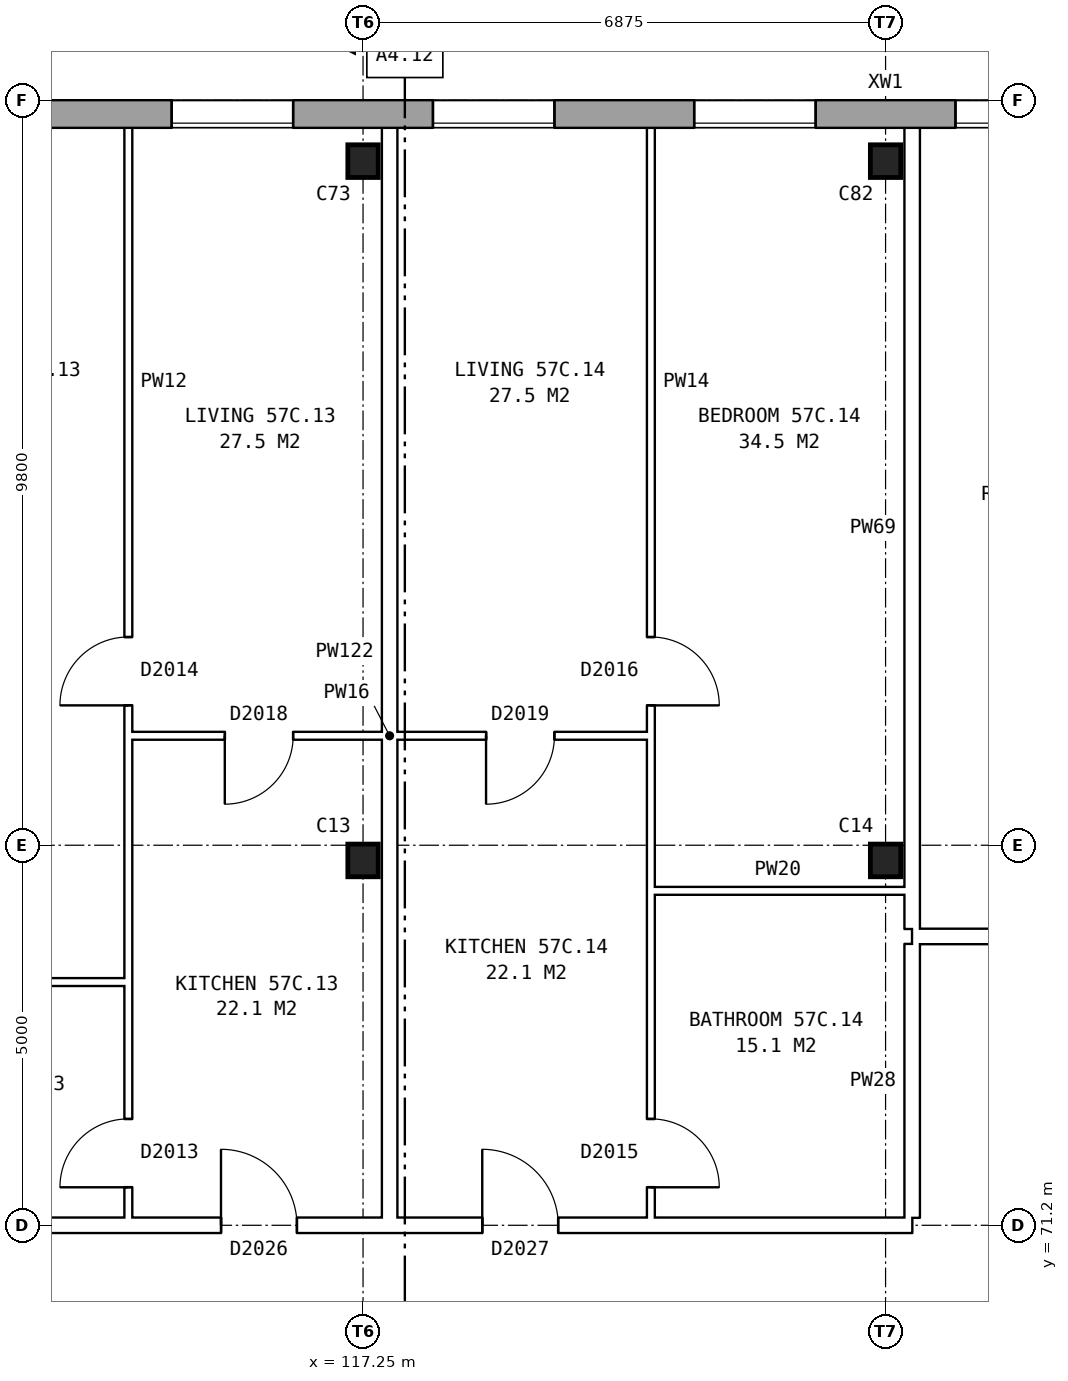
"""IFC4 building model, lengths in metres.
Left out: names, types, materials, properties, quantities, classifications, styles, units other than length and angle.
Written with IfcOpenShell. Run it as: python <this file> out.ifc"""

import sys

from ifc_helpers import new_model, si_unit, direction, frame, frame_2d, origin, origin_2d, place, context, subcontext, project, spatial, rectangle, i_section, extrude, element, fill, save


model = new_model("IFC4")
c1 = context("Model", 3, precision=1e-05, world=origin(), true_north=direction((0.0, 1.0)))
c2 = subcontext(c1, "Body", "Model", "MODEL_VIEW")
j1 = project(units=[si_unit("LENGTHUNIT", "METRE"), si_unit("PLANEANGLEUNIT", "RADIAN")], contexts=[c1])
p1 = place(None, origin())
s1 = spatial("IfcSite", under=j1, at=p1, CompositionType="ELEMENT")
p2 = place(p1, origin())
s2 = spatial("IfcBuilding", under=s1, at=p2, CompositionType="ELEMENT")
p3 = place(p2, frame((0.0, 0.0, 202.8)))
s3 = spatial("IfcBuildingStorey", under=s2, at=p3, CompositionType="ELEMENT", Elevation=202.8)
for number, where, z_axis, x_axis in (
    (1, (117.25, 76.0, 0.0), (0.0, 0.0, 1.0), (1.0, 0.0, 0.0)),
    (2, (124.125, 76.0, 0.0), (0.0, 0.0, 1.0), (1.0, 0.0, 0.0)),
    (3, (117.25, 85.2, 0.0), (0.0, 0.0, 1.0), (1.0, 0.0, 0.0)),
    (4, (124.125, 85.2, 0.0), (0.0, 0.0, 1.0), (1.0, 0.0, 0.0)),
):
    element("IfcColumn", number, at=place(p3, frame(where, z_axis=z_axis, x_axis=x_axis)), inside=s3, PredefinedType="COLUMN", context=c2, shape_type="SweptSolid", body=[
        extrude(i_section(OverallWidth=0.4, OverallDepth=0.43, WebThickness=0.04, FlangeThickness=0.04, at=origin_2d()), origin(), (0.0, 0.0, 1.0), 2.85),
    ])
p4 = place(p3, frame((131.05, 85.82, 0.0), z_axis=(0.0, 0.0, 1.0), x_axis=(-1.0, 0.0, 0.0)))
e5 = element("IfcWall", 5, at=p4, inside=s3, PredefinedType="STANDARD", context=c2, shape_type="SweptSolid", body=[
    extrude(rectangle(XDim=55.1, YDim=0.36, at=frame_2d((27.55, 0.0))), origin(), (0.0, 0.0, 1.0), 2.85),
])
p5 = place(p4, frame((0.969, 0.0, 0.8)))
e6 = element("IfcOpeningElement", 6, at=p5, cuts=e5, PredefinedType="OPENING", context=c2, shape_type="SweptSolid", body=[
    extrude(rectangle(XDim=1.6, YDim=1.8, at=frame_2d((0.8, 0.9))), frame((0.0, 0.19, 0.0), z_axis=(0.0, -1.0, 0.0), x_axis=(1.0, 0.0, 0.0)), (0.0, 0.0, 1.0), 0.38),
])
p6 = place(p4, frame((4.406, 0.0, 0.8)))
e7 = element("IfcOpeningElement", 7, at=p6, cuts=e5, PredefinedType="OPENING", context=c2, shape_type="SweptSolid", body=[
    extrude(rectangle(XDim=1.6, YDim=1.8, at=frame_2d((0.8, 0.9))), frame((0.0, 0.19, 0.0), z_axis=(0.0, -1.0, 0.0), x_axis=(1.0, 0.0, 0.0)), (0.0, 0.0, 1.0), 0.38),
])
p7 = place(p4, frame((7.844, 0.0, 0.8)))
e8 = element("IfcOpeningElement", 8, at=p7, cuts=e5, PredefinedType="OPENING", context=c2, shape_type="SweptSolid", body=[
    extrude(rectangle(XDim=1.6, YDim=1.8, at=frame_2d((0.8, 0.9))), frame((0.0, 0.19, 0.0), z_axis=(0.0, -1.0, 0.0), x_axis=(1.0, 0.0, 0.0)), (0.0, 0.0, 1.0), 0.38),
])
p8 = place(p4, frame((11.281, 0.0, 0.8)))
e9 = element("IfcOpeningElement", 9, at=p8, cuts=e5, PredefinedType="OPENING", context=c2, shape_type="SweptSolid", body=[
    extrude(rectangle(XDim=1.6, YDim=1.8, at=frame_2d((0.8, 0.9))), frame((0.0, 0.19, 0.0), z_axis=(0.0, -1.0, 0.0), x_axis=(1.0, 0.0, 0.0)), (0.0, 0.0, 1.0), 0.38),
])
p9 = place(p4, frame((14.719, 0.0, 0.8)))
e10 = element("IfcOpeningElement", 10, at=p9, cuts=e5, PredefinedType="OPENING", context=c2, shape_type="SweptSolid", body=[
    extrude(rectangle(XDim=1.6, YDim=1.8, at=frame_2d((0.8, 0.9))), frame((0.0, 0.19, 0.0), z_axis=(0.0, -1.0, 0.0), x_axis=(1.0, 0.0, 0.0)), (0.0, 0.0, 1.0), 0.38),
])
p10 = place(p4, frame((18.156, 0.0, 0.8)))
e11 = element("IfcOpeningElement", 11, at=p10, cuts=e5, PredefinedType="OPENING", context=c2, shape_type="SweptSolid", body=[
    extrude(rectangle(XDim=1.6, YDim=1.8, at=frame_2d((0.8, 0.9))), frame((0.0, 0.19, 0.0), z_axis=(0.0, -1.0, 0.0), x_axis=(1.0, 0.0, 0.0)), (0.0, 0.0, 1.0), 0.38),
])
p11 = place(p4, frame((21.594, 0.0, 0.8)))
e12 = element("IfcOpeningElement", 12, at=p11, cuts=e5, PredefinedType="OPENING", context=c2, shape_type="SweptSolid", body=[
    extrude(rectangle(XDim=1.6, YDim=1.8, at=frame_2d((0.8, 0.9))), frame((0.0, 0.19, 0.0), z_axis=(0.0, -1.0, 0.0), x_axis=(1.0, 0.0, 0.0)), (0.0, 0.0, 1.0), 0.38),
])
p12 = place(p4, frame((25.031, 0.0, 0.8)))
e13 = element("IfcOpeningElement", 13, at=p12, cuts=e5, PredefinedType="OPENING", context=c2, shape_type="SweptSolid", body=[
    extrude(rectangle(XDim=1.6, YDim=1.8, at=frame_2d((0.8, 0.9))), frame((0.0, 0.19, 0.0), z_axis=(0.0, -1.0, 0.0), x_axis=(1.0, 0.0, 0.0)), (0.0, 0.0, 1.0), 0.38),
])
p13 = place(p4, frame((28.469, 0.0, 0.8)))
e14 = element("IfcOpeningElement", 14, at=p13, cuts=e5, PredefinedType="OPENING", context=c2, shape_type="SweptSolid", body=[
    extrude(rectangle(XDim=1.6, YDim=1.8, at=frame_2d((0.8, 0.9))), frame((0.0, 0.19, 0.0), z_axis=(0.0, -1.0, 0.0), x_axis=(1.0, 0.0, 0.0)), (0.0, 0.0, 1.0), 0.38),
])
p14 = place(p4, frame((31.906, 0.0, 0.8)))
e15 = element("IfcOpeningElement", 15, at=p14, cuts=e5, PredefinedType="OPENING", context=c2, shape_type="SweptSolid", body=[
    extrude(rectangle(XDim=1.6, YDim=1.8, at=frame_2d((0.8, 0.9))), frame((0.0, 0.19, 0.0), z_axis=(0.0, -1.0, 0.0), x_axis=(1.0, 0.0, 0.0)), (0.0, 0.0, 1.0), 0.38),
])
p15 = place(p4, frame((35.344, 0.0, 0.8)))
e16 = element("IfcOpeningElement", 16, at=p15, cuts=e5, PredefinedType="OPENING", context=c2, shape_type="SweptSolid", body=[
    extrude(rectangle(XDim=1.6, YDim=1.8, at=frame_2d((0.8, 0.9))), frame((0.0, 0.19, 0.0), z_axis=(0.0, -1.0, 0.0), x_axis=(1.0, 0.0, 0.0)), (0.0, 0.0, 1.0), 0.38),
])
p16 = place(p4, frame((38.781, 0.0, 0.8)))
e17 = element("IfcOpeningElement", 17, at=p16, cuts=e5, PredefinedType="OPENING", context=c2, shape_type="SweptSolid", body=[
    extrude(rectangle(XDim=1.6, YDim=1.8, at=frame_2d((0.8, 0.9))), frame((0.0, 0.19, 0.0), z_axis=(0.0, -1.0, 0.0), x_axis=(1.0, 0.0, 0.0)), (0.0, 0.0, 1.0), 0.38),
])
p17 = place(p4, frame((42.219, 0.0, 0.8)))
e18 = element("IfcOpeningElement", 18, at=p17, cuts=e5, PredefinedType="OPENING", context=c2, shape_type="SweptSolid", body=[
    extrude(rectangle(XDim=1.6, YDim=1.8, at=frame_2d((0.8, 0.9))), frame((0.0, 0.19, 0.0), z_axis=(0.0, -1.0, 0.0), x_axis=(1.0, 0.0, 0.0)), (0.0, 0.0, 1.0), 0.38),
])
p18 = place(p4, frame((45.656, 0.0, 0.8)))
e19 = element("IfcOpeningElement", 19, at=p18, cuts=e5, PredefinedType="OPENING", context=c2, shape_type="SweptSolid", body=[
    extrude(rectangle(XDim=1.6, YDim=1.8, at=frame_2d((0.8, 0.9))), frame((0.0, 0.19, 0.0), z_axis=(0.0, -1.0, 0.0), x_axis=(1.0, 0.0, 0.0)), (0.0, 0.0, 1.0), 0.38),
])
p19 = place(p4, frame((49.094, 0.0, 0.8)))
e20 = element("IfcOpeningElement", 20, at=p19, cuts=e5, PredefinedType="OPENING", context=c2, shape_type="SweptSolid", body=[
    extrude(rectangle(XDim=1.6, YDim=1.8, at=frame_2d((0.8, 0.9))), frame((0.0, 0.19, 0.0), z_axis=(0.0, -1.0, 0.0), x_axis=(1.0, 0.0, 0.0)), (0.0, 0.0, 1.0), 0.38),
])
p20 = place(p4, frame((52.531, 0.0, 0.8)))
e21 = element("IfcOpeningElement", 21, at=p20, cuts=e5, PredefinedType="OPENING", context=c2, shape_type="SweptSolid", body=[
    extrude(rectangle(XDim=1.6, YDim=1.8, at=frame_2d((0.8, 0.9))), frame((0.0, 0.19, 0.0), z_axis=(0.0, -1.0, 0.0), x_axis=(1.0, 0.0, 0.0)), (0.0, 0.0, 1.0), 0.38),
])
p21 = place(p3, frame((83.225, 71.2, 0.0), z_axis=(0.0, 0.0, 1.0), x_axis=(1.0, 0.0, 0.0)))
e22 = element("IfcWall", 22, at=p21, inside=s3, PredefinedType="PARTITIONING", context=c2, shape_type="SweptSolid", body=[
    extrude(rectangle(XDim=41.25, YDim=0.2, at=frame_2d((20.625, 0.0))), origin(), (0.0, 0.0, 1.0), 2.85),
])
p22 = place(p21, frame((4.656, 0.0, 0.0)))
e23 = element("IfcOpeningElement", 23, at=p22, cuts=e22, PredefinedType="OPENING", context=c2, shape_type="SweptSolid", body=[
    extrude(rectangle(XDim=1.0, YDim=2.1, at=frame_2d((0.5, 1.05))), frame((0.0, 0.11, 0.0), z_axis=(0.0, -1.0, 0.0), x_axis=(1.0, 0.0, 0.0)), (0.0, 0.0, 1.0), 0.22),
])
p23 = place(p21, frame((11.531, 0.0, 0.0)))
e24 = element("IfcOpeningElement", 24, at=p23, cuts=e22, PredefinedType="OPENING", context=c2, shape_type="SweptSolid", body=[
    extrude(rectangle(XDim=1.0, YDim=2.1, at=frame_2d((0.5, 1.05))), frame((0.0, 0.11, 0.0), z_axis=(0.0, -1.0, 0.0), x_axis=(1.0, 0.0, 0.0)), (0.0, 0.0, 1.0), 0.22),
])
p24 = place(p21, frame((21.844, 0.0, 0.0)))
e25 = element("IfcOpeningElement", 25, at=p24, cuts=e22, PredefinedType="OPENING", context=c2, shape_type="SweptSolid", body=[
    extrude(rectangle(XDim=1.0, YDim=2.1, at=frame_2d((0.5, 1.05))), frame((0.0, 0.11, 0.0), z_axis=(0.0, -1.0, 0.0), x_axis=(1.0, 0.0, 0.0)), (0.0, 0.0, 1.0), 0.22),
])
p25 = place(p21, frame((32.156, 0.0, 0.0)))
e26 = element("IfcOpeningElement", 26, at=p25, cuts=e22, PredefinedType="OPENING", context=c2, shape_type="SweptSolid", body=[
    extrude(rectangle(XDim=1.0, YDim=2.1, at=frame_2d((0.5, 1.05))), frame((0.0, 0.11, 0.0), z_axis=(0.0, -1.0, 0.0), x_axis=(1.0, 0.0, 0.0)), (0.0, 0.0, 1.0), 0.22),
])
p26 = place(p21, frame((35.594, 0.0, 0.0)))
e27 = element("IfcOpeningElement", 27, at=p26, cuts=e22, PredefinedType="OPENING", context=c2, shape_type="SweptSolid", body=[
    extrude(rectangle(XDim=1.0, YDim=2.1, at=frame_2d((0.5, 1.05))), frame((0.0, 0.11, 0.0), z_axis=(0.0, -1.0, 0.0), x_axis=(1.0, 0.0, 0.0)), (0.0, 0.0, 1.0), 0.22),
])
p27 = place(p3, frame((110.825, 74.4, 0.0), z_axis=(0.0, 0.0, 1.0), x_axis=(1.0, 0.0, 0.0)))
e28 = element("IfcWall", 28, at=p27, inside=s3, PredefinedType="PARTITIONING", context=c2, shape_type="SweptSolid", body=[
    extrude(rectangle(XDim=3.337, YDim=0.1, at=frame_2d((1.668, 0.0))), origin(), (0.0, 0.0, 1.0), 2.85),
])
p28 = place(p3, frame((124.475, 75.0, 0.0), z_axis=(0.0, 0.0, 1.0), x_axis=(1.0, 0.0, 0.0)))
e29 = element("IfcWall", 29, at=p28, inside=s3, PredefinedType="PARTITIONING", context=c2, shape_type="SweptSolid", body=[
    extrude(rectangle(XDim=6.885, YDim=0.2, at=frame_2d((3.442, 0.0))), origin(), (0.0, 0.0, 1.0), 2.85),
])
p29 = place(p28, frame((2.992, 0.0, 0.0)))
e30 = element("IfcOpeningElement", 30, at=p29, cuts=e29, PredefinedType="OPENING", context=c2, shape_type="SweptSolid", body=[
    extrude(rectangle(XDim=0.9, YDim=2.1, at=frame_2d((0.45, 1.05))), frame((0.0, 0.11, 0.0), z_axis=(0.0, -1.0, 0.0), x_axis=(1.0, 0.0, 0.0)), (0.0, 0.0, 1.0), 0.22),
])
p30 = place(p3, frame((121.037, 75.6, 0.0), z_axis=(0.0, 0.0, 1.0), x_axis=(1.0, 0.0, 0.0)))
e31 = element("IfcWall", 31, at=p30, inside=s3, PredefinedType="PARTITIONING", context=c2, shape_type="SweptSolid", body=[
    extrude(rectangle(XDim=3.338, YDim=0.1, at=frame_2d((1.669, 0.0))), origin(), (0.0, 0.0, 1.0), 2.85),
])
p31 = place(p3, frame((114.162, 77.64, 0.0), z_axis=(0.0, 0.0, 1.0), x_axis=(1.0, 0.0, 0.0)))
e32 = element("IfcWall", 32, at=p31, inside=s3, PredefinedType="PARTITIONING", context=c2, shape_type="SweptSolid", body=[
    extrude(rectangle(XDim=6.875, YDim=0.1, at=frame_2d((3.438, 0.0))), origin(), (0.0, 0.0, 1.0), 2.85),
])
p32 = place(p31, frame((1.269, 0.0, 0.0)))
e33 = element("IfcOpeningElement", 33, at=p32, cuts=e32, PredefinedType="OPENING", context=c2, shape_type="SweptSolid", body=[
    extrude(rectangle(XDim=0.9, YDim=2.1, at=frame_2d((0.45, 1.05))), frame((0.0, 0.06, 0.0), z_axis=(0.0, -1.0, 0.0), x_axis=(1.0, 0.0, 0.0)), (0.0, 0.0, 1.0), 0.12),
])
p33 = place(p31, frame((4.707, 0.0, 0.0)))
e34 = element("IfcOpeningElement", 34, at=p33, cuts=e32, PredefinedType="OPENING", context=c2, shape_type="SweptSolid", body=[
    extrude(rectangle(XDim=0.9, YDim=2.1, at=frame_2d((0.45, 1.05))), frame((0.0, 0.06, 0.0), z_axis=(0.0, -1.0, 0.0), x_axis=(1.0, 0.0, 0.0)), (0.0, 0.0, 1.0), 0.12),
])
p34 = place(p3, frame((114.162, 71.3, 0.0), z_axis=(0.0, 0.0, 1.0), x_axis=(0.0, 1.0, 0.0)))
e35 = element("IfcWall", 35, at=p34, inside=s3, PredefinedType="PARTITIONING", context=c2, shape_type="SweptSolid", body=[
    extrude(rectangle(XDim=14.34, YDim=0.1, at=frame_2d((7.17, 0.0))), origin(), (0.0, 0.0, 1.0), 2.85),
])
p35 = place(p34, frame((6.74, 0.0, 0.0)))
e36 = element("IfcOpeningElement", 36, at=p35, cuts=e35, PredefinedType="OPENING", context=c2, shape_type="SweptSolid", body=[
    extrude(rectangle(XDim=0.9, YDim=2.1, at=frame_2d((0.45, 1.05))), frame((0.0, 0.06, 0.0), z_axis=(0.0, -1.0, 0.0), x_axis=(1.0, 0.0, 0.0)), (0.0, 0.0, 1.0), 0.12),
])
p36 = place(p34, frame((0.4, 0.0, 0.0)))
e37 = element("IfcOpeningElement", 37, at=p36, cuts=e35, PredefinedType="OPENING", context=c2, shape_type="SweptSolid", body=[
    extrude(rectangle(XDim=0.9, YDim=2.1, at=frame_2d((0.45, 1.05))), frame((0.0, 0.06, 0.0), z_axis=(0.0, -1.0, 0.0), x_axis=(1.0, 0.0, 0.0)), (0.0, 0.0, 1.0), 0.12),
])
p37 = place(p3, frame((117.6, 71.3, 0.0), z_axis=(0.0, 0.0, 1.0), x_axis=(0.0, 1.0, 0.0)))
e38 = element("IfcWall", 38, at=p37, inside=s3, PredefinedType="PARTITIONING", context=c2, shape_type="SweptSolid", body=[
    extrude(rectangle(XDim=14.34, YDim=0.2, at=frame_2d((7.17, 0.0))), origin(), (0.0, 0.0, 1.0), 2.85),
])
p38 = place(p3, frame((121.037, 71.3, 0.0), z_axis=(0.0, 0.0, 1.0), x_axis=(0.0, 1.0, 0.0)))
e39 = element("IfcWall", 39, at=p38, inside=s3, PredefinedType="PARTITIONING", context=c2, shape_type="SweptSolid", body=[
    extrude(rectangle(XDim=14.34, YDim=0.1, at=frame_2d((7.17, 0.0))), origin(), (0.0, 0.0, 1.0), 2.85),
])
p39 = place(p38, frame((6.74, 0.0, 0.0)))
e40 = element("IfcOpeningElement", 40, at=p39, cuts=e39, PredefinedType="OPENING", context=c2, shape_type="SweptSolid", body=[
    extrude(rectangle(XDim=0.9, YDim=2.1, at=frame_2d((0.45, 1.05))), frame((0.0, 0.06, 0.0), z_axis=(0.0, -1.0, 0.0), x_axis=(1.0, 0.0, 0.0)), (0.0, 0.0, 1.0), 0.12),
])
p40 = place(p38, frame((0.4, 0.0, 0.0)))
e41 = element("IfcOpeningElement", 41, at=p40, cuts=e39, PredefinedType="OPENING", context=c2, shape_type="SweptSolid", body=[
    extrude(rectangle(XDim=0.9, YDim=2.1, at=frame_2d((0.45, 1.05))), frame((0.0, 0.06, 0.0), z_axis=(0.0, -1.0, 0.0), x_axis=(1.0, 0.0, 0.0)), (0.0, 0.0, 1.0), 0.12),
])
p41 = place(p3, frame((124.475, 71.3, 0.0), z_axis=(0.0, 0.0, 1.0), x_axis=(0.0, 1.0, 0.0)))
e42 = element("IfcWall", 42, at=p41, inside=s3, PredefinedType="PARTITIONING", context=c2, shape_type="SweptSolid", body=[
    extrude(rectangle(XDim=3.6, YDim=0.2, at=frame_2d((1.8, 0.0))), origin(), (0.0, 0.0, 1.0), 2.85),
])
p42 = place(p3, frame((124.475, 75.1, 0.0), z_axis=(0.0, 0.0, 1.0), x_axis=(0.0, 1.0, 0.0)))
e43 = element("IfcWall", 43, at=p42, inside=s3, PredefinedType="PARTITIONING", context=c2, shape_type="SweptSolid", body=[
    extrude(rectangle(XDim=10.54, YDim=0.2, at=frame_2d((5.27, 0.0))), origin(), (0.0, 0.0, 1.0), 2.85),
])
p43 = place(p6, origin())
e44 = element("IfcWindow", 44, at=p43, inside=s3, PartitioningType="SINGLE_PANEL", PredefinedType="WINDOW", context=c2, shape_type="SweptSolid", body=[
    extrude(rectangle(XDim=1.6, YDim=1.8, at=frame_2d((0.8, 0.9))), frame((0.0, 0.15, 0.0), z_axis=(0.0, -1.0, 0.0), x_axis=(1.0, 0.0, 0.0)), (0.0, 0.0, 1.0), 0.06),
])
fill(e7, e44)
p44 = place(p7, origin())
e45 = element("IfcWindow", 45, at=p44, inside=s3, PartitioningType="SINGLE_PANEL", PredefinedType="WINDOW", context=c2, shape_type="SweptSolid", body=[
    extrude(rectangle(XDim=1.6, YDim=1.8, at=frame_2d((0.8, 0.9))), frame((0.0, 0.15, 0.0), z_axis=(0.0, -1.0, 0.0), x_axis=(1.0, 0.0, 0.0)), (0.0, 0.0, 1.0), 0.06),
])
fill(e8, e45)
p45 = place(p8, origin())
e46 = element("IfcWindow", 46, at=p45, inside=s3, PartitioningType="SINGLE_PANEL", PredefinedType="WINDOW", context=c2, shape_type="SweptSolid", body=[
    extrude(rectangle(XDim=1.6, YDim=1.8, at=frame_2d((0.8, 0.9))), frame((0.0, 0.15, 0.0), z_axis=(0.0, -1.0, 0.0), x_axis=(1.0, 0.0, 0.0)), (0.0, 0.0, 1.0), 0.06),
])
fill(e9, e46)
p46 = place(p9, origin())
e47 = element("IfcWindow", 47, at=p46, inside=s3, PartitioningType="SINGLE_PANEL", PredefinedType="WINDOW", context=c2, shape_type="SweptSolid", body=[
    extrude(rectangle(XDim=1.6, YDim=1.8, at=frame_2d((0.8, 0.9))), frame((0.0, 0.15, 0.0), z_axis=(0.0, -1.0, 0.0), x_axis=(1.0, 0.0, 0.0)), (0.0, 0.0, 1.0), 0.06),
])
fill(e10, e47)
p47 = place(p35, origin())
e48 = element("IfcDoor", 48, at=p47, inside=s3, OperationType="SINGLE_SWING_LEFT", PredefinedType="DOOR", context=c2, shape_type="SweptSolid", body=[
    extrude(rectangle(XDim=0.9, YDim=2.1, at=frame_2d((0.45, 1.05))), frame((0.0, 0.025, 0.0), z_axis=(0.0, -1.0, 0.0), x_axis=(1.0, 0.0, 0.0)), (0.0, 0.0, 1.0), 0.05),
])
fill(e36, e48)
p48 = place(p25, origin())
e49 = element("IfcDoor", 49, at=p48, inside=s3, OperationType="SINGLE_SWING_LEFT", PredefinedType="DOOR", context=c2, shape_type="SweptSolid", body=[
    extrude(rectangle(XDim=1.0, YDim=2.1, at=frame_2d((0.5, 1.05))), frame((0.0, 0.025, 0.0), z_axis=(0.0, -1.0, 0.0), x_axis=(1.0, 0.0, 0.0)), (0.0, 0.0, 1.0), 0.05),
])
fill(e26, e49)
p49 = place(p32, frame((0.9, 0.0, 0.0), z_axis=(0.0, 0.0, 1.0), x_axis=(-1.0, 0.0, 0.0)))
e50 = element("IfcDoor", 50, at=p49, inside=s3, OperationType="SINGLE_SWING_RIGHT", PredefinedType="DOOR", context=c2, shape_type="SweptSolid", body=[
    extrude(rectangle(XDim=0.9, YDim=2.1, at=frame_2d((0.45, 1.05))), frame((0.0, 0.025, 0.0), z_axis=(0.0, -1.0, 0.0), x_axis=(1.0, 0.0, 0.0)), (0.0, 0.0, 1.0), 0.05),
])
fill(e33, e50)
p50 = place(p36, origin())
e51 = element("IfcDoor", 51, at=p50, inside=s3, OperationType="SINGLE_SWING_LEFT", PredefinedType="DOOR", context=c2, shape_type="SweptSolid", body=[
    extrude(rectangle(XDim=0.9, YDim=2.1, at=frame_2d((0.45, 1.05))), frame((0.0, 0.025, 0.0), z_axis=(0.0, -1.0, 0.0), x_axis=(1.0, 0.0, 0.0)), (0.0, 0.0, 1.0), 0.05),
])
fill(e37, e51)
p51 = place(p39, frame((0.9, 0.0, 0.0), z_axis=(0.0, 0.0, 1.0), x_axis=(-1.0, 0.0, 0.0)))
e52 = element("IfcDoor", 52, at=p51, inside=s3, OperationType="SINGLE_SWING_RIGHT", PredefinedType="DOOR", context=c2, shape_type="SweptSolid", body=[
    extrude(rectangle(XDim=0.9, YDim=2.1, at=frame_2d((0.45, 1.05))), frame((0.0, 0.025, 0.0), z_axis=(0.0, -1.0, 0.0), x_axis=(1.0, 0.0, 0.0)), (0.0, 0.0, 1.0), 0.05),
])
fill(e40, e52)
p52 = place(p26, origin())
e53 = element("IfcDoor", 53, at=p52, inside=s3, OperationType="SINGLE_SWING_LEFT", PredefinedType="DOOR", context=c2, shape_type="SweptSolid", body=[
    extrude(rectangle(XDim=1.0, YDim=2.1, at=frame_2d((0.5, 1.05))), frame((0.0, 0.025, 0.0), z_axis=(0.0, -1.0, 0.0), x_axis=(1.0, 0.0, 0.0)), (0.0, 0.0, 1.0), 0.05),
])
fill(e27, e53)
p53 = place(p33, frame((0.9, 0.0, 0.0), z_axis=(0.0, 0.0, 1.0), x_axis=(-1.0, 0.0, 0.0)))
e54 = element("IfcDoor", 54, at=p53, inside=s3, OperationType="SINGLE_SWING_RIGHT", PredefinedType="DOOR", context=c2, shape_type="SweptSolid", body=[
    extrude(rectangle(XDim=0.9, YDim=2.1, at=frame_2d((0.45, 1.05))), frame((0.0, 0.025, 0.0), z_axis=(0.0, -1.0, 0.0), x_axis=(1.0, 0.0, 0.0)), (0.0, 0.0, 1.0), 0.05),
])
fill(e34, e54)
p54 = place(p40, frame((0.9, 0.0, 0.0), z_axis=(0.0, 0.0, 1.0), x_axis=(-1.0, 0.0, 0.0)))
e55 = element("IfcDoor", 55, at=p54, inside=s3, OperationType="SINGLE_SWING_RIGHT", PredefinedType="DOOR", context=c2, shape_type="SweptSolid", body=[
    extrude(rectangle(XDim=0.9, YDim=2.1, at=frame_2d((0.45, 1.05))), frame((0.0, 0.025, 0.0), z_axis=(0.0, -1.0, 0.0), x_axis=(1.0, 0.0, 0.0)), (0.0, 0.0, 1.0), 0.05),
])
fill(e41, e55)
save(model, sys.argv[1])
